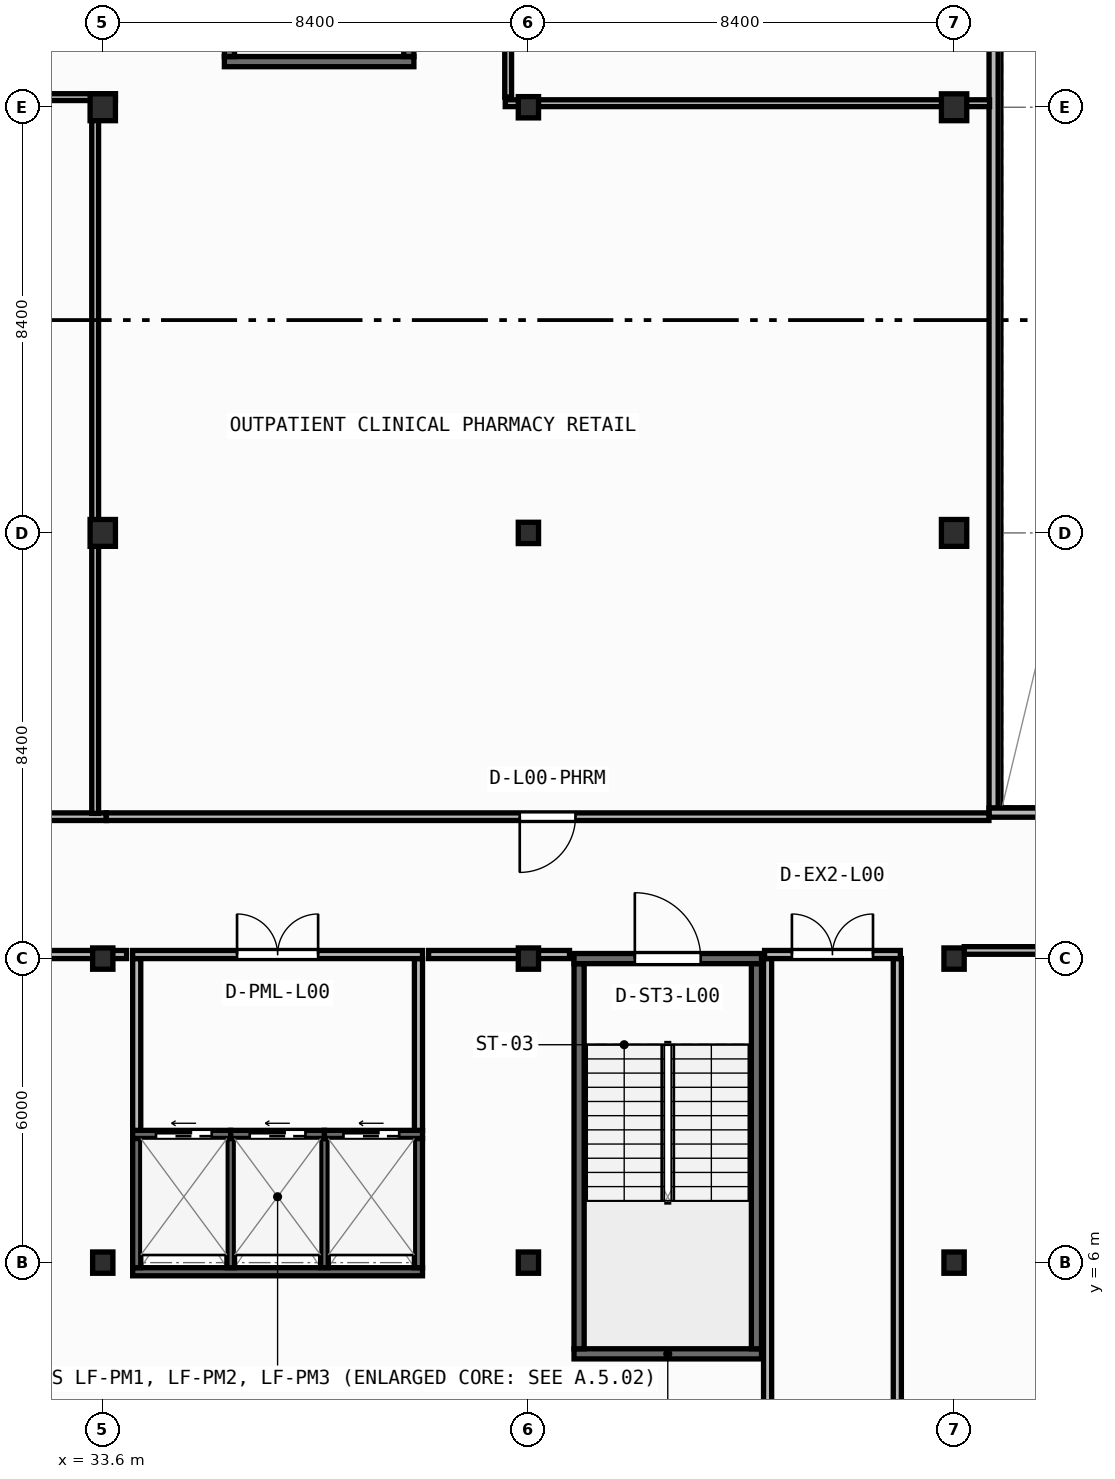
"""IFC4 building model, lengths in metres.
Left out: names, types, materials, properties, quantities, classifications, styles, units other than length and angle.
Written with IfcOpenShell. Run it as: python <this file> out.ifc"""

import sys

from ifc_helpers import new_model, si_unit, direction, frame, frame_2d, origin, origin_2d, place, context, subcontext, project, spatial, rectangle, i_section, extrude, element, fill, save


model = new_model("IFC4")
c1 = context("Model", 3, precision=1e-05, world=origin(), true_north=direction((0.0, 1.0)))
c2 = subcontext(c1, "Body", "Model", "MODEL_VIEW")
j1 = project(units=[si_unit("LENGTHUNIT", "METRE"), si_unit("PLANEANGLEUNIT", "RADIAN")], contexts=[c1])
p1 = place(None, origin())
s1 = spatial("IfcSite", under=j1, at=p1, CompositionType="ELEMENT")
p2 = place(p1, origin())
s2 = spatial("IfcBuilding", under=s1, at=p2, CompositionType="ELEMENT")
p3 = place(p2, origin())
s3 = spatial("IfcBuildingStorey", under=s2, at=p3, CompositionType="ELEMENT", Elevation=0.0)
for number, where, z_axis, x_axis in (
    (1, (33.6, 6.0, 0.0), (0.0, 0.0, 1.0), (1.0, 0.0, 0.0)),
    (2, (42.0, 6.0, 0.0), (0.0, 0.0, 1.0), (1.0, 0.0, 0.0)),
    (3, (50.4, 6.0, 0.0), (0.0, 0.0, 1.0), (1.0, 0.0, 0.0)),
    (4, (33.6, 12.0, 0.0), (0.0, 0.0, 1.0), (1.0, 0.0, 0.0)),
    (5, (42.0, 12.0, 0.0), (0.0, 0.0, 1.0), (1.0, 0.0, 0.0)),
    (6, (50.4, 12.0, 0.0), (0.0, 0.0, 1.0), (1.0, 0.0, 0.0)),
):
    element("IfcColumn", number, at=place(p3, frame(where, z_axis=z_axis, x_axis=x_axis)), inside=s3, PredefinedType="COLUMN", context=c2, shape_type="SweptSolid", body=[
        extrude(i_section(OverallWidth=0.4, OverallDepth=0.42, WebThickness=0.025, FlangeThickness=0.04, at=origin_2d()), origin(), (0.0, 0.0, 1.0), 4.5),
    ])
p4 = place(p3, frame((33.6, 20.4, 0.0), z_axis=(0.0, 0.0, 1.0), x_axis=(1.0, 0.0, 0.0)))
e7 = element("IfcColumn", 7, at=p4, inside=s3, PredefinedType="COLUMN", context=c2, shape_type="SweptSolid", body=[
    extrude(i_section(OverallWidth=0.5, OverallDepth=0.53, WebThickness=0.028, FlangeThickness=0.045, at=origin_2d()), origin(), (0.0, 0.0, 1.0), 4.5),
])
p5 = place(p3, frame((42.0, 20.4, 0.0), z_axis=(0.0, 0.0, 1.0), x_axis=(1.0, 0.0, 0.0)))
e8 = element("IfcColumn", 8, at=p5, inside=s3, PredefinedType="COLUMN", context=c2, shape_type="SweptSolid", body=[
    extrude(i_section(OverallWidth=0.4, OverallDepth=0.42, WebThickness=0.025, FlangeThickness=0.04, at=origin_2d()), origin(), (0.0, 0.0, 1.0), 4.5),
])
for number, where, z_axis, x_axis in (
    (9, (50.4, 20.4, 0.0), (0.0, 0.0, 1.0), (1.0, 0.0, 0.0)),
    (10, (33.6, 28.8, 0.0), (0.0, 0.0, 1.0), (1.0, 0.0, 0.0)),
):
    element("IfcColumn", number, at=place(p3, frame(where, z_axis=z_axis, x_axis=x_axis)), inside=s3, PredefinedType="COLUMN", context=c2, shape_type="SweptSolid", body=[
        extrude(i_section(OverallWidth=0.5, OverallDepth=0.53, WebThickness=0.028, FlangeThickness=0.045, at=origin_2d()), origin(), (0.0, 0.0, 1.0), 4.5),
    ])
p6 = place(p3, frame((42.0, 28.8, 0.0), z_axis=(0.0, 0.0, 1.0), x_axis=(1.0, 0.0, 0.0)))
e11 = element("IfcColumn", 11, at=p6, inside=s3, PredefinedType="COLUMN", context=c2, shape_type="SweptSolid", body=[
    extrude(i_section(OverallWidth=0.4, OverallDepth=0.42, WebThickness=0.025, FlangeThickness=0.04, at=origin_2d()), origin(), (0.0, 0.0, 1.0), 4.5),
])
p7 = place(p3, frame((50.4, 28.8, 0.0), z_axis=(0.0, 0.0, 1.0), x_axis=(1.0, 0.0, 0.0)))
e12 = element("IfcColumn", 12, at=p7, inside=s3, PredefinedType="COLUMN", context=c2, shape_type="SweptSolid", body=[
    extrude(i_section(OverallWidth=0.5, OverallDepth=0.53, WebThickness=0.028, FlangeThickness=0.045, at=origin_2d()), origin(), (0.0, 0.0, 1.0), 4.5),
])
p8 = place(p3, frame((42.9, 4.2, 0.0), z_axis=(0.0, 0.0, 1.0), x_axis=(1.0, 0.0, 0.0)))
e13 = element("IfcWall", 13, at=p8, inside=s3, PredefinedType="SHEAR", context=c2, shape_type="SweptSolid", body=[
    extrude(rectangle(XDim=3.7, YDim=0.2, at=frame_2d((1.85, 0.0))), origin(), (0.0, 0.0, 1.0), 4.25),
])
for number, where, z_axis, x_axis in (
    (14, (43.0, 4.3, 0.0), (0.0, 0.0, 1.0), (0.0, 1.0, 0.0)),
    (15, (46.5, 4.3, 0.0), (0.0, 0.0, 1.0), (0.0, 1.0, 0.0)),
):
    element("IfcWall", number, at=place(p3, frame(where, z_axis=z_axis, x_axis=x_axis)), inside=s3, PredefinedType="SHEAR", context=c2, shape_type="SweptSolid", body=[
        extrude(rectangle(XDim=7.6, YDim=0.2, at=frame_2d((3.8, 0.0))), origin(), (0.0, 0.0, 1.0), 4.25),
    ])
p9 = place(p3, frame((42.9, 12.0, 0.0), z_axis=(0.0, 0.0, 1.0), x_axis=(1.0, 0.0, 0.0)))
e16 = element("IfcWall", 16, at=p9, inside=s3, PredefinedType="SHEAR", context=c2, shape_type="SweptSolid", body=[
    extrude(rectangle(XDim=3.7, YDim=0.2, at=frame_2d((1.85, 0.0))), origin(), (0.0, 0.0, 1.0), 4.25),
])
p10 = place(p9, frame((1.2, 0.0, 0.0)))
e17 = element("IfcOpeningElement", 17, at=p10, cuts=e16, PredefinedType="OPENING", context=c2, shape_type="SweptSolid", body=[
    extrude(rectangle(XDim=1.3, YDim=2.15, at=frame_2d((0.65, 1.075))), frame((0.0, 0.11, 0.0), z_axis=(0.0, -1.0, 0.0), x_axis=(1.0, 0.0, 0.0)), (0.0, 0.0, 1.0), 0.22),
])
p11 = place(p3, frame((36.0, 29.7, 0.0), z_axis=(0.0, 0.0, 1.0), x_axis=(1.0, 0.0, 0.0)))
e18 = element("IfcWall", 18, at=p11, inside=s3, PredefinedType="SHEAR", context=c2, shape_type="SweptSolid", body=[
    extrude(rectangle(XDim=3.74, YDim=0.2, at=frame_2d((1.87, 0.0))), origin(), (0.0, 0.0, 1.0), 4.25),
])
for number, where, z_axis, x_axis in (
    (19, (36.1, 29.8, 0.0), (0.0, 0.0, 1.0), (0.0, 1.0, 0.0)),
    (20, (39.64, 29.8, 0.0), (0.0, 0.0, 1.0), (0.0, 1.0, 0.0)),
):
    element("IfcWall", number, at=place(p3, frame(where, z_axis=z_axis, x_axis=x_axis)), inside=s3, PredefinedType="SHEAR", context=c2, shape_type="SweptSolid", body=[
        extrude(rectangle(XDim=6.8, YDim=0.2, at=frame_2d((3.4, 0.0))), origin(), (0.0, 0.0, 1.0), 4.25),
    ])
for number, where, z_axis, x_axis in (
    (21, (46.72, -0.48, 0.0), (0.0, 0.0, 1.0), (0.0, 1.0, 0.0)),
    (22, (49.28, -0.48, 0.0), (0.0, 0.0, 1.0), (0.0, 1.0, 0.0)),
):
    element("IfcWall", number, at=place(p3, frame(where, z_axis=z_axis, x_axis=x_axis)), inside=s3, PredefinedType="PARTITIONING", context=c2, shape_type="SweptSolid", body=[
        extrude(rectangle(XDim=12.48, YDim=0.16, at=frame_2d((6.24, 0.0))), origin(), (0.0, 0.0, 1.0), 4.25),
    ])
p12 = place(p3, frame((46.66, 12.08, 0.0), z_axis=(0.0, 0.0, 1.0), x_axis=(1.0, 0.0, 0.0)))
e23 = element("IfcWall", 23, at=p12, inside=s3, PredefinedType="PARTITIONING", context=c2, shape_type="SweptSolid", body=[
    extrude(rectangle(XDim=2.68, YDim=0.16, at=frame_2d((1.34, 0.0))), origin(), (0.0, 0.0, 1.0), 3.425),
])
p13 = place(p12, frame((0.54, 0.0, 0.0)))
e24 = element("IfcOpeningElement", 24, at=p13, cuts=e23, PredefinedType="OPENING", context=c2, shape_type="SweptSolid", body=[
    extrude(rectangle(XDim=1.6, YDim=2.05, at=frame_2d((0.8, 1.025))), frame((0.0, 0.09, 0.0), z_axis=(0.0, -1.0, 0.0), x_axis=(1.0, 0.0, 0.0)), (0.0, 0.0, 1.0), 0.18),
])
p14 = place(p3, frame((51.18, 14.97, 0.0), z_axis=(0.0, 0.0, 1.0), x_axis=(0.0, 1.0, 0.0)))
e25 = element("IfcWall", 25, at=p14, inside=s3, PredefinedType="PARTITIONING", context=c2, shape_type="SweptSolid", body=[
    extrude(rectangle(XDim=31.51, YDim=0.18, at=frame_2d((15.755, 0.0))), origin(), (0.0, 0.0, 1.0), 4.25),
])
p15 = place(p3, frame((51.09, 14.88, 0.0), z_axis=(0.0, 0.0, 1.0), x_axis=(1.0, 0.0, 0.0)))
e26 = element("IfcWall", 26, at=p15, inside=s3, PredefinedType="PARTITIONING", context=c2, shape_type="SweptSolid", body=[
    extrude(rectangle(XDim=7.02, YDim=0.18, at=frame_2d((3.51, 0.0))), origin(), (0.0, 0.0, 1.0), 4.25),
])
p16 = place(p3, frame((34.19, 5.82, 0.0), z_axis=(0.0, 0.0, 1.0), x_axis=(1.0, 0.0, 0.0)))
e27 = element("IfcWall", 27, at=p16, inside=s3, PredefinedType="SHEAR", context=c2, shape_type="SweptSolid", body=[
    extrude(rectangle(XDim=5.72, YDim=0.16, at=frame_2d((2.86, 0.0))), origin(), (0.0, 0.0, 1.0), 4.25),
])
for number, where, z_axis, x_axis in (
    (28, (34.27, 5.9, 0.0), (0.0, 0.0, 1.0), (0.0, 1.0, 0.0)),
    (29, (39.83, 5.9, 0.0), (0.0, 0.0, 1.0), (0.0, 1.0, 0.0)),
):
    element("IfcWall", number, at=place(p3, frame(where, z_axis=z_axis, x_axis=x_axis)), inside=s3, PredefinedType="SHEAR", context=c2, shape_type="SweptSolid", body=[
        extrude(rectangle(XDim=2.55, YDim=0.16, at=frame_2d((1.275, 0.0))), origin(), (0.0, 0.0, 1.0), 4.25),
    ])
for number, where, z_axis, x_axis in (
    (30, (36.125, 5.9, 0.0), (0.0, 0.0, 1.0), (0.0, 1.0, 0.0)),
    (31, (37.975, 5.9, 0.0), (0.0, 0.0, 1.0), (0.0, 1.0, 0.0)),
):
    element("IfcWall", number, at=place(p3, frame(where, z_axis=z_axis, x_axis=x_axis)), inside=s3, PredefinedType="SHEAR", context=c2, shape_type="SweptSolid", body=[
        extrude(rectangle(XDim=2.55, YDim=0.15, at=frame_2d((1.275, 0.0))), origin(), (0.0, 0.0, 1.0), 4.25),
    ])
p17 = place(p3, frame((34.19, 8.53, 0.0), z_axis=(0.0, 0.0, 1.0), x_axis=(1.0, 0.0, 0.0)))
e32 = element("IfcWall", 32, at=p17, inside=s3, PredefinedType="SHEAR", context=c2, shape_type="SweptSolid", body=[
    extrude(rectangle(XDim=1.935, YDim=0.16, at=frame_2d((0.968, 0.0))), origin(), (0.0, 0.0, 1.0), 4.25),
])
p18 = place(p17, frame((0.46, 0.0, 0.0)))
e33 = element("IfcOpeningElement", 33, at=p18, cuts=e32, PredefinedType="OPENING", context=c2, shape_type="SweptSolid", body=[
    extrude(rectangle(XDim=1.1, YDim=2.15, at=frame_2d((0.55, 1.075))), frame((0.0, 0.09, 0.0), z_axis=(0.0, -1.0, 0.0), x_axis=(1.0, 0.0, 0.0)), (0.0, 0.0, 1.0), 0.18),
])
p19 = place(p3, frame((36.125, 8.53, 0.0), z_axis=(0.0, 0.0, 1.0), x_axis=(1.0, 0.0, 0.0)))
e34 = element("IfcWall", 34, at=p19, inside=s3, PredefinedType="SHEAR", context=c2, shape_type="SweptSolid", body=[
    extrude(rectangle(XDim=1.85, YDim=0.16, at=frame_2d((0.925, 0.0))), origin(), (0.0, 0.0, 1.0), 4.25),
])
p20 = place(p19, frame((0.375, 0.0, 0.0)))
e35 = element("IfcOpeningElement", 35, at=p20, cuts=e34, PredefinedType="OPENING", context=c2, shape_type="SweptSolid", body=[
    extrude(rectangle(XDim=1.1, YDim=2.15, at=frame_2d((0.55, 1.075))), frame((0.0, 0.09, 0.0), z_axis=(0.0, -1.0, 0.0), x_axis=(1.0, 0.0, 0.0)), (0.0, 0.0, 1.0), 0.18),
])
p21 = place(p3, frame((37.975, 8.53, 0.0), z_axis=(0.0, 0.0, 1.0), x_axis=(1.0, 0.0, 0.0)))
e36 = element("IfcWall", 36, at=p21, inside=s3, PredefinedType="SHEAR", context=c2, shape_type="SweptSolid", body=[
    extrude(rectangle(XDim=1.935, YDim=0.16, at=frame_2d((0.967, 0.0))), origin(), (0.0, 0.0, 1.0), 4.25),
])
p22 = place(p21, frame((0.375, 0.0, 0.0)))
e37 = element("IfcOpeningElement", 37, at=p22, cuts=e36, PredefinedType="OPENING", context=c2, shape_type="SweptSolid", body=[
    extrude(rectangle(XDim=1.1, YDim=2.15, at=frame_2d((0.55, 1.075))), frame((0.0, 0.09, 0.0), z_axis=(0.0, -1.0, 0.0), x_axis=(1.0, 0.0, 0.0)), (0.0, 0.0, 1.0), 0.18),
])
for number, where, z_axis, x_axis in (
    (38, (34.27, 8.61, 0.0), (0.0, 0.0, 1.0), (0.0, 1.0, 0.0)),
    (39, (39.83, 8.61, 0.0), (0.0, 0.0, 1.0), (0.0, 1.0, 0.0)),
):
    element("IfcWall", number, at=place(p3, frame(where, z_axis=z_axis, x_axis=x_axis)), inside=s3, PredefinedType="PARTITIONING", context=c2, shape_type="SweptSolid", body=[
        extrude(rectangle(XDim=3.39, YDim=0.16, at=frame_2d((1.695, 0.0))), origin(), (0.0, 0.0, 1.0), 4.25),
    ])
p23 = place(p3, frame((34.19, 12.08, 0.0), z_axis=(0.0, 0.0, 1.0), x_axis=(1.0, 0.0, 0.0)))
e40 = element("IfcWall", 40, at=p23, inside=s3, PredefinedType="PARTITIONING", context=c2, shape_type="SweptSolid", body=[
    extrude(rectangle(XDim=5.72, YDim=0.16, at=frame_2d((2.86, 0.0))), origin(), (0.0, 0.0, 1.0), 3.425),
])
p24 = place(p23, frame((2.06, 0.0, 0.0)))
e41 = element("IfcOpeningElement", 41, at=p24, cuts=e40, PredefinedType="OPENING", context=c2, shape_type="SweptSolid", body=[
    extrude(rectangle(XDim=1.6, YDim=2.05, at=frame_2d((0.8, 1.025))), frame((0.0, 0.09, 0.0), z_axis=(0.0, -1.0, 0.0), x_axis=(1.0, 0.0, 0.0)), (0.0, 0.0, 1.0), 0.18),
])
p25 = place(p3, frame((50.6, 12.16, 0.0), z_axis=(0.0, 0.0, 1.0), x_axis=(1.0, 0.0, 0.0)))
e42 = element("IfcWall", 42, at=p25, inside=s3, PredefinedType="PARTITIONING", context=c2, shape_type="SweptSolid", body=[
    extrude(rectangle(XDim=7.7, YDim=0.15, at=frame_2d((3.85, 0.0))), origin(), (0.0, 0.0, 1.0), 3.425),
])
p26 = place(p25, frame((3.3, 0.0, 0.0)))
e43 = element("IfcOpeningElement", 43, at=p26, cuts=e42, PredefinedType="OPENING", context=c2, shape_type="SweptSolid", body=[
    extrude(rectangle(XDim=1.1, YDim=2.1, at=frame_2d((0.55, 1.05))), frame((0.0, 0.085, 0.0), z_axis=(0.0, -1.0, 0.0), x_axis=(1.0, 0.0, 0.0)), (0.0, 0.0, 1.0), 0.17),
])
p27 = place(p3, frame((33.668, 14.8, 0.0), z_axis=(0.0, 0.0, 1.0), x_axis=(-1.0, 0.0, 0.0)))
e44 = element("IfcWall", 44, at=p27, inside=s3, PredefinedType="PARTITIONING", context=c2, shape_type="SweptSolid", body=[
    extrude(rectangle(XDim=16.498, YDim=0.15, at=frame_2d((8.249, 0.0))), origin(), (0.0, 0.0, 1.0), 4.25),
])
p28 = place(p27, frame((7.699, 0.0, 0.0)))
e45 = element("IfcOpeningElement", 45, at=p28, cuts=e44, PredefinedType="OPENING", context=c2, shape_type="SweptSolid", body=[
    extrude(rectangle(XDim=1.1, YDim=2.1, at=frame_2d((0.55, 1.05))), frame((0.0, 0.085, 0.0), z_axis=(0.0, -1.0, 0.0), x_axis=(1.0, 0.0, 0.0)), (0.0, 0.0, 1.0), 0.17),
])
p29 = place(p3, frame((51.088, 14.8, 0.0), z_axis=(0.0, 0.0, 1.0), x_axis=(-1.0, 0.0, 0.0)))
e46 = element("IfcWall", 46, at=p29, inside=s3, PredefinedType="PARTITIONING", context=c2, shape_type="SweptSolid", body=[
    extrude(rectangle(XDim=17.418, YDim=0.15, at=frame_2d((8.709, 0.0))), origin(), (0.0, 0.0, 1.0), 4.25),
])
p30 = place(p29, frame((8.159, 0.0, 0.0)))
e47 = element("IfcOpeningElement", 47, at=p30, cuts=e46, PredefinedType="OPENING", context=c2, shape_type="SweptSolid", body=[
    extrude(rectangle(XDim=1.1, YDim=2.1, at=frame_2d((0.55, 1.05))), frame((0.0, 0.085, 0.0), z_axis=(0.0, -1.0, 0.0), x_axis=(1.0, 0.0, 0.0)), (0.0, 0.0, 1.0), 0.17),
])
p31 = place(p3, frame((17.1, 29.0, 0.0), z_axis=(0.0, 0.0, 1.0), x_axis=(1.0, 0.0, 0.0)))
e48 = element("IfcWall", 48, at=p31, inside=s3, PredefinedType="PARTITIONING", context=c2, shape_type="SweptSolid", body=[
    extrude(rectangle(XDim=16.75, YDim=0.135, at=frame_2d((8.375, 0.0))), origin(), (0.0, 0.0, 1.0), 3.425),
])
p32 = place(p3, frame((41.6, 29.0, 0.0), z_axis=(0.0, 0.0, 1.0), x_axis=(0.0, 1.0, 0.0)))
e49 = element("IfcWall", 49, at=p32, inside=s3, PredefinedType="PARTITIONING", context=c2, shape_type="SweptSolid", body=[
    extrude(rectangle(XDim=13.6, YDim=0.135, at=frame_2d((6.8, 0.0))), origin(), (0.0, 0.0, 1.0), 3.623),
])
p33 = place(p32, frame((11.998, 0.0, 0.0)))
e50 = element("IfcOpeningElement", 50, at=p33, cuts=e49, PredefinedType="OPENING", context=c2, shape_type="SweptSolid", body=[
    extrude(rectangle(XDim=1.1, YDim=2.1, at=frame_2d((0.55, 1.05))), frame((0.0, 0.077, 0.0), z_axis=(0.0, -1.0, 0.0), x_axis=(1.0, 0.0, 0.0)), (0.0, 0.0, 1.0), 0.155),
])
p34 = place(p3, frame((33.45, 14.865, 0.0), z_axis=(0.0, 0.0, 1.0), x_axis=(0.0, 1.0, 0.0)))
e51 = element("IfcWall", 51, at=p34, inside=s3, PredefinedType="PARTITIONING", context=c2, shape_type="SweptSolid", body=[
    extrude(rectangle(XDim=14.077, YDim=0.135, at=frame_2d((7.039, 0.0))), origin(), (0.0, 0.0, 1.0), 3.623),
])
p35 = place(p3, frame((51.1, 28.88, 0.0), z_axis=(0.0, 0.0, 1.0), x_axis=(-1.0, 0.0, 0.0)))
e52 = element("IfcWall", 52, at=p35, inside=s3, PredefinedType="PARTITIONING", context=c2, shape_type="SweptSolid", body=[
    extrude(rectangle(XDim=9.558, YDim=0.135, at=frame_2d((4.779, 0.0))), origin(), (0.0, 0.0, 1.0), 3.425),
])
p36 = place(p3, frame((31.63, 12.08, 0.0), z_axis=(0.0, 0.0, 1.0), x_axis=(1.0, 0.0, 0.0)))
e53 = element("IfcWall", 53, at=p36, inside=s3, PredefinedType="PARTITIONING", context=c2, shape_type="SweptSolid", body=[
    extrude(rectangle(XDim=2.44, YDim=0.16, at=frame_2d((1.22, 0.0))), origin(), (0.0, 0.0, 1.0), 3.425),
])
p37 = place(p3, frame((40.03, 12.08, 0.0), z_axis=(0.0, 0.0, 1.0), x_axis=(1.0, 0.0, 0.0)))
e54 = element("IfcWall", 54, at=p37, inside=s3, PredefinedType="PARTITIONING", context=c2, shape_type="SweptSolid", body=[
    extrude(rectangle(XDim=2.781, YDim=0.16, at=frame_2d((1.39, 0.0))), origin(), (0.0, 0.0, 1.0), 3.425),
])
p38 = place(p10, origin())
e55 = element("IfcDoor", 55, at=p38, inside=s3, OperationType="SINGLE_SWING_LEFT", PredefinedType="DOOR", context=c2, shape_type="SweptSolid", body=[
    extrude(rectangle(XDim=1.3, YDim=2.15, at=frame_2d((0.65, 1.075))), frame((0.0, 0.025, 0.0), z_axis=(0.0, -1.0, 0.0), x_axis=(1.0, 0.0, 0.0)), (0.0, 0.0, 1.0), 0.05),
])
fill(e17, e55)
p39 = place(p13, origin())
e56 = element("IfcDoor", 56, at=p39, inside=s3, OperationType="DOUBLE_DOOR_SINGLE_SWING", PredefinedType="DOOR", context=c2, shape_type="SweptSolid", body=[
    extrude(rectangle(XDim=1.6, YDim=2.05, at=frame_2d((0.8, 1.025))), frame((0.0, 0.025, 0.0), z_axis=(0.0, -1.0, 0.0), x_axis=(1.0, 0.0, 0.0)), (0.0, 0.0, 1.0), 0.05),
])
fill(e24, e56)
p40 = place(p18, origin())
e57 = element("IfcDoor", 57, at=p40, inside=s3, OperationType="SLIDING_TO_LEFT", PredefinedType="DOOR", context=c2, shape_type="SweptSolid", body=[
    extrude(rectangle(XDim=1.1, YDim=2.15, at=frame_2d((0.55, 1.075))), frame((0.0, 0.025, 0.0), z_axis=(0.0, -1.0, 0.0), x_axis=(1.0, 0.0, 0.0)), (0.0, 0.0, 1.0), 0.05),
])
fill(e33, e57)
p41 = place(p20, origin())
e58 = element("IfcDoor", 58, at=p41, inside=s3, OperationType="SLIDING_TO_LEFT", PredefinedType="DOOR", context=c2, shape_type="SweptSolid", body=[
    extrude(rectangle(XDim=1.1, YDim=2.15, at=frame_2d((0.55, 1.075))), frame((0.0, 0.025, 0.0), z_axis=(0.0, -1.0, 0.0), x_axis=(1.0, 0.0, 0.0)), (0.0, 0.0, 1.0), 0.05),
])
fill(e35, e58)
p42 = place(p22, origin())
e59 = element("IfcDoor", 59, at=p42, inside=s3, OperationType="SLIDING_TO_LEFT", PredefinedType="DOOR", context=c2, shape_type="SweptSolid", body=[
    extrude(rectangle(XDim=1.1, YDim=2.15, at=frame_2d((0.55, 1.075))), frame((0.0, 0.025, 0.0), z_axis=(0.0, -1.0, 0.0), x_axis=(1.0, 0.0, 0.0)), (0.0, 0.0, 1.0), 0.05),
])
fill(e37, e59)
p43 = place(p24, origin())
e60 = element("IfcDoor", 60, at=p43, inside=s3, OperationType="DOUBLE_DOOR_SINGLE_SWING", PredefinedType="DOOR", context=c2, shape_type="SweptSolid", body=[
    extrude(rectangle(XDim=1.6, YDim=2.05, at=frame_2d((0.8, 1.025))), frame((0.0, 0.025, 0.0), z_axis=(0.0, -1.0, 0.0), x_axis=(1.0, 0.0, 0.0)), (0.0, 0.0, 1.0), 0.05),
])
fill(e41, e60)
p44 = place(p30, origin())
e61 = element("IfcDoor", 61, at=p44, inside=s3, OperationType="SINGLE_SWING_RIGHT", PredefinedType="DOOR", context=c2, shape_type="SweptSolid", body=[
    extrude(rectangle(XDim=1.1, YDim=2.1, at=frame_2d((0.55, 1.05))), frame((0.0, 0.025, 0.0), z_axis=(0.0, -1.0, 0.0), x_axis=(1.0, 0.0, 0.0)), (0.0, 0.0, 1.0), 0.05),
])
fill(e47, e61)
save(model, sys.argv[1])
